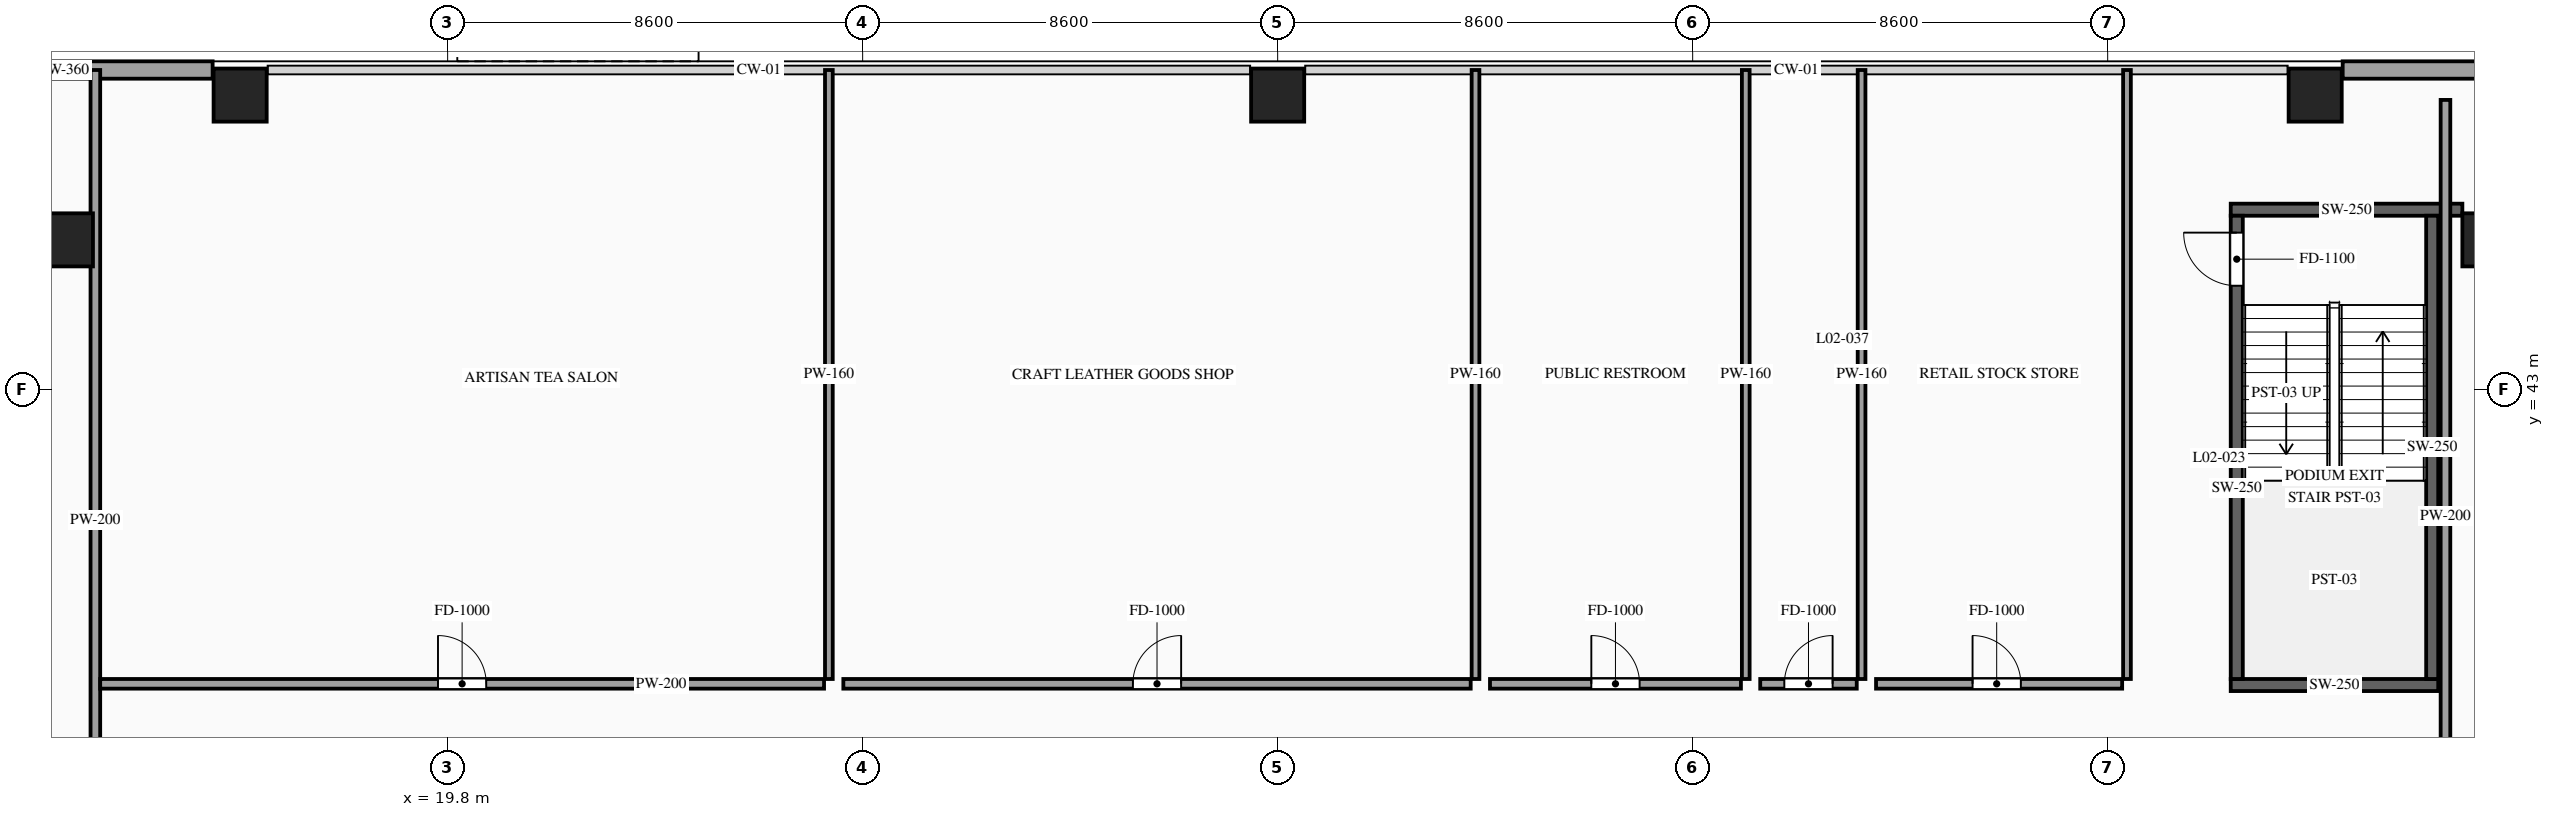
"""IFC4 building model, lengths in metres.
Left out: names, types, materials, properties, quantities, classifications, styles, units other than length and angle.
Written with IfcOpenShell. Run it as: python <this file> out.ifc"""

import sys

from ifc_helpers import new_model, si_unit, direction, frame, frame_2d, origin, origin_2d, place, context, subcontext, project, spatial, rectangle, extrude, source, transform, mapped, element, fill, save


model = new_model("IFC4")
c1 = context("Model", 3, precision=1e-05, world=origin(), true_north=direction((0.0, 1.0)))
c2 = subcontext(c1, "Body", "Model", "MODEL_VIEW")
j1 = project(units=[si_unit("LENGTHUNIT", "METRE"), si_unit("PLANEANGLEUNIT", "RADIAN")], contexts=[c1])
p1 = place(None, origin())
s1 = spatial("IfcSite", under=j1, at=p1, CompositionType="ELEMENT")
p2 = place(p1, origin())
s2 = spatial("IfcBuilding", under=s1, at=p2, CompositionType="ELEMENT")
p3 = place(p2, frame((0.0, 0.0, 5.4)))
s3 = spatial("IfcBuildingStorey", under=s2, at=p3, CompositionType="ELEMENT", Elevation=5.4)
m1 = source(origin(), c2, "Body", "SweptSolid", [
    extrude(rectangle(XDim=1.1, YDim=1.1, at=origin_2d()), origin(), (0.0, 0.0, 1.0), 4.8),
])
for number, where, z_axis, x_axis in (
    (1, (11.9, 46.1, 0.0), (0.0, 0.0, 1.0), (1.0, 0.0, 0.0)),
    (2, (62.1, 46.1, 0.0), (0.0, 0.0, 1.0), (1.0, 0.0, 0.0)),
    (3, (15.5, 49.1, 0.0), (0.0, 0.0, 1.0), (1.0, 0.0, 0.0)),
    (4, (37.0, 49.1, 0.0), (0.0, 0.0, 1.0), (1.0, 0.0, 0.0)),
    (5, (58.5, 49.1, 0.0), (0.0, 0.0, 1.0), (1.0, 0.0, 0.0)),
):
    element("IfcColumn", number, at=place(p3, frame(where, z_axis=z_axis, x_axis=x_axis)), inside=s3, PredefinedType="COLUMN", context=c2, shape_type="MappedRepresentation", body=[
        mapped(m1, transform((0.0, 0.0, 0.0), scale=1.0)),
    ])
p4 = place(p3, frame((2.0, 49.62, 0.0), z_axis=(0.0, 0.0, 1.0), x_axis=(1.0, 0.0, 0.0)))
e6 = element("IfcWall", 6, at=p4, inside=s3, PredefinedType="SOLIDWALL", context=c2, shape_type="SweptSolid", body=[
    extrude(rectangle(XDim=12.93, YDim=0.36, at=frame_2d((6.465, 0.0))), origin(), (0.0, 0.0, 1.0), 4.52),
])
p5 = place(p4, frame((4.7, 0.0, 0.9)))
e7 = element("IfcOpeningElement", 7, at=p5, cuts=e6, PredefinedType="OPENING", context=c2, shape_type="SweptSolid", body=[
    extrude(rectangle(XDim=1.8, YDim=2.2, at=frame_2d((0.9, 1.1))), frame((0.0, 0.195, 0.0), z_axis=(0.0, -1.0, 0.0), x_axis=(1.0, 0.0, 0.0)), (0.0, 0.0, 1.0), 0.39),
])
p6 = place(p3, frame((59.07, 49.62, 0.0), z_axis=(0.0, 0.0, 1.0), x_axis=(1.0, 0.0, 0.0)))
e8 = element("IfcWall", 8, at=p6, inside=s3, PredefinedType="SOLIDWALL", context=c2, shape_type="SweptSolid", body=[
    extrude(rectangle(XDim=12.93, YDim=0.36, at=frame_2d((6.465, 0.0))), origin(), (0.0, 0.0, 1.0), 4.52),
])
p7 = place(p6, frame((6.03, 0.0, 0.9)))
e9 = element("IfcOpeningElement", 9, at=p7, cuts=e8, PredefinedType="OPENING", context=c2, shape_type="SweptSolid", body=[
    extrude(rectangle(XDim=1.8, YDim=2.2, at=frame_2d((0.9, 1.1))), frame((0.0, 0.195, 0.0), z_axis=(0.0, -1.0, 0.0), x_axis=(1.0, 0.0, 0.0)), (0.0, 0.0, 1.0), 0.39),
])
m2 = source(origin(), c2, "Body", "SweptSolid", [
    extrude(rectangle(XDim=4.3, YDim=0.25, at=frame_2d((2.15, 0.0))), origin(), (0.0, 0.0, 1.0), 4.52),
])
p8 = place(p3, frame((56.75, 36.875, 0.0), z_axis=(0.0, 0.0, 1.0), x_axis=(1.0, 0.0, 0.0)))
e10 = element("IfcWall", 10, at=p8, inside=s3, PredefinedType="SOLIDWALL", context=c2, shape_type="MappedRepresentation", body=[
    mapped(m2, transform((0.0, 0.0, 0.0), scale=1.0)),
])
m3 = source(origin(), c2, "Body", "SweptSolid", [
    extrude(rectangle(XDim=4.8, YDim=0.25, at=frame_2d((2.4, 0.0))), origin(), (0.0, 0.0, 1.0), 4.52),
])
p9 = place(p3, frame((56.75, 46.725, 0.0), z_axis=(0.0, 0.0, 1.0), x_axis=(1.0, 0.0, 0.0)))
e11 = element("IfcWall", 11, at=p9, inside=s3, PredefinedType="SOLIDWALL", context=c2, shape_type="MappedRepresentation", body=[
    mapped(m3, transform((0.0, 0.0, 0.0), scale=1.0)),
])
p10 = place(p3, frame((56.875, 37.0, 0.0), z_axis=(0.0, 0.0, 1.0), x_axis=(0.0, 1.0, 0.0)))
e12 = element("IfcWall", 12, at=p10, inside=s3, PredefinedType="SOLIDWALL", context=c2, shape_type="SweptSolid", body=[
    extrude(rectangle(XDim=9.6, YDim=0.25, at=frame_2d((4.8, 0.0))), origin(), (0.0, 0.0, 1.0), 4.52),
])
p11 = place(p10, frame((8.15, 0.0, 0.0)))
e13 = element("IfcOpeningElement", 13, at=p11, cuts=e12, PredefinedType="OPENING", context=c2, shape_type="SweptSolid", body=[
    extrude(rectangle(XDim=1.1, YDim=2.2, at=frame_2d((0.55, 1.1))), frame((0.0, 0.14, 0.0), z_axis=(0.0, -1.0, 0.0), x_axis=(1.0, 0.0, 0.0)), (0.0, 0.0, 1.0), 0.28),
])
m4 = source(origin(), c2, "Body", "SweptSolid", [
    extrude(rectangle(XDim=9.6, YDim=0.25, at=frame_2d((4.8, 0.0))), origin(), (0.0, 0.0, 1.0), 4.52),
])
p12 = place(p3, frame((60.925, 37.0, 0.0), z_axis=(0.0, 0.0, 1.0), x_axis=(0.0, 1.0, 0.0)))
e14 = element("IfcWall", 14, at=p12, inside=s3, PredefinedType="SOLIDWALL", context=c2, shape_type="MappedRepresentation", body=[
    mapped(m4, transform((0.0, 0.0, 0.0), scale=1.0)),
])
p13 = place(p3, frame((12.5, 24.8, 0.0), z_axis=(0.0, 0.0, 1.0), x_axis=(0.0, 1.0, 0.0)))
e15 = element("IfcWall", 15, at=p13, inside=s3, PredefinedType="PARTITIONING", context=c2, shape_type="SweptSolid", body=[
    extrude(rectangle(XDim=24.82, YDim=0.2, at=frame_2d((12.41, 0.0))), origin(), (0.0, 0.0, 1.0), 4.52),
])
p14 = place(p13, frame((4.9, 0.0, 0.0)))
e16 = element("IfcOpeningElement", 16, at=p14, cuts=e15, PredefinedType="OPENING", context=c2, shape_type="SweptSolid", body=[
    extrude(rectangle(XDim=1.0, YDim=2.2, at=frame_2d((0.5, 1.1))), frame((0.0, 0.115, 0.0), z_axis=(0.0, -1.0, 0.0), x_axis=(1.0, 0.0, 0.0)), (0.0, 0.0, 1.0), 0.23),
])
p15 = place(p3, frame((61.2, 24.8, 0.0), z_axis=(0.0, 0.0, 1.0), x_axis=(0.0, 1.0, 0.0)))
e17 = element("IfcWall", 17, at=p15, inside=s3, PredefinedType="PARTITIONING", context=c2, shape_type="SweptSolid", body=[
    extrude(rectangle(XDim=24.2, YDim=0.2, at=frame_2d((12.1, 0.0))), origin(), (0.0, 0.0, 1.0), 4.52),
])
p16 = place(p15, frame((5.7, 0.0, 0.0)))
e18 = element("IfcOpeningElement", 18, at=p16, cuts=e17, PredefinedType="OPENING", context=c2, shape_type="SweptSolid", body=[
    extrude(rectangle(XDim=1.0, YDim=2.2, at=frame_2d((0.5, 1.1))), frame((0.0, 0.115, 0.0), z_axis=(0.0, -1.0, 0.0), x_axis=(1.0, 0.0, 0.0)), (0.0, 0.0, 1.0), 0.23),
])
p17 = place(p3, frame((12.6, 36.9, 0.0), z_axis=(0.0, 0.0, 1.0), x_axis=(1.0, 0.0, 0.0)))
e19 = element("IfcWall", 19, at=p17, inside=s3, PredefinedType="PARTITIONING", context=c2, shape_type="SweptSolid", body=[
    extrude(rectangle(XDim=15.0, YDim=0.2, at=frame_2d((7.5, 0.0))), origin(), (0.0, 0.0, 1.0), 4.52),
])
p18 = place(p17, frame((7.0, 0.0, 0.0)))
e20 = element("IfcOpeningElement", 20, at=p18, cuts=e19, PredefinedType="OPENING", context=c2, shape_type="SweptSolid", body=[
    extrude(rectangle(XDim=1.0, YDim=2.2, at=frame_2d((0.5, 1.1))), frame((0.0, 0.115, 0.0), z_axis=(0.0, -1.0, 0.0), x_axis=(1.0, 0.0, 0.0)), (0.0, 0.0, 1.0), 0.23),
])
m5 = source(origin(), c2, "Body", "SweptSolid", [
    extrude(rectangle(XDim=12.62, YDim=0.16, at=frame_2d((6.31, 0.0))), origin(), (0.0, 0.0, 1.0), 4.52),
])
p19 = place(p3, frame((27.7, 37.0, 0.0), z_axis=(0.0, 0.0, 1.0), x_axis=(0.0, 1.0, 0.0)))
e21 = element("IfcWall", 21, at=p19, inside=s3, PredefinedType="PARTITIONING", context=c2, shape_type="MappedRepresentation", body=[
    mapped(m5, transform((0.0, 0.0, 0.0), scale=1.0)),
])
p20 = place(p3, frame((28.0, 36.9, 0.0), z_axis=(0.0, 0.0, 1.0), x_axis=(1.0, 0.0, 0.0)))
e22 = element("IfcWall", 22, at=p20, inside=s3, PredefinedType="PARTITIONING", context=c2, shape_type="SweptSolid", body=[
    extrude(rectangle(XDim=13.0, YDim=0.2, at=frame_2d((6.5, 0.0))), origin(), (0.0, 0.0, 1.0), 4.52),
])
p21 = place(p20, frame((6.0, 0.0, 0.0)))
e23 = element("IfcOpeningElement", 23, at=p21, cuts=e22, PredefinedType="OPENING", context=c2, shape_type="SweptSolid", body=[
    extrude(rectangle(XDim=1.0, YDim=2.2, at=frame_2d((0.5, 1.1))), frame((0.0, 0.115, 0.0), z_axis=(0.0, -1.0, 0.0), x_axis=(1.0, 0.0, 0.0)), (0.0, 0.0, 1.0), 0.23),
])
p22 = place(p3, frame((41.1, 37.0, 0.0), z_axis=(0.0, 0.0, 1.0), x_axis=(0.0, 1.0, 0.0)))
e24 = element("IfcWall", 24, at=p22, inside=s3, PredefinedType="PARTITIONING", context=c2, shape_type="MappedRepresentation", body=[
    mapped(m5, transform((0.0, 0.0, 0.0), scale=1.0)),
])
p23 = place(p3, frame((41.4, 36.9, 0.0), z_axis=(0.0, 0.0, 1.0), x_axis=(1.0, 0.0, 0.0)))
e25 = element("IfcWall", 25, at=p23, inside=s3, PredefinedType="PARTITIONING", context=c2, shape_type="SweptSolid", body=[
    extrude(rectangle(XDim=5.2, YDim=0.2, at=frame_2d((2.6, 0.0))), origin(), (0.0, 0.0, 1.0), 4.52),
])
p24 = place(p23, frame((2.1, 0.0, 0.0)))
e26 = element("IfcOpeningElement", 26, at=p24, cuts=e25, PredefinedType="OPENING", context=c2, shape_type="SweptSolid", body=[
    extrude(rectangle(XDim=1.0, YDim=2.2, at=frame_2d((0.5, 1.1))), frame((0.0, 0.115, 0.0), z_axis=(0.0, -1.0, 0.0), x_axis=(1.0, 0.0, 0.0)), (0.0, 0.0, 1.0), 0.23),
])
p25 = place(p3, frame((46.7, 37.0, 0.0), z_axis=(0.0, 0.0, 1.0), x_axis=(0.0, 1.0, 0.0)))
e27 = element("IfcWall", 27, at=p25, inside=s3, PredefinedType="PARTITIONING", context=c2, shape_type="MappedRepresentation", body=[
    mapped(m5, transform((0.0, 0.0, 0.0), scale=1.0)),
])
p26 = place(p3, frame((47.0, 36.9, 0.0), z_axis=(0.0, 0.0, 1.0), x_axis=(1.0, 0.0, 0.0)))
e28 = element("IfcWall", 28, at=p26, inside=s3, PredefinedType="PARTITIONING", context=c2, shape_type="SweptSolid", body=[
    extrude(rectangle(XDim=2.0, YDim=0.2, at=frame_2d((1.0, 0.0))), origin(), (0.0, 0.0, 1.0), 4.52),
])
p27 = place(p26, frame((0.5, 0.0, 0.0)))
e29 = element("IfcOpeningElement", 29, at=p27, cuts=e28, PredefinedType="OPENING", context=c2, shape_type="SweptSolid", body=[
    extrude(rectangle(XDim=1.0, YDim=2.2, at=frame_2d((0.5, 1.1))), frame((0.0, 0.115, 0.0), z_axis=(0.0, -1.0, 0.0), x_axis=(1.0, 0.0, 0.0)), (0.0, 0.0, 1.0), 0.23),
])
p28 = place(p3, frame((49.1, 37.0, 0.0), z_axis=(0.0, 0.0, 1.0), x_axis=(0.0, 1.0, 0.0)))
e30 = element("IfcWall", 30, at=p28, inside=s3, PredefinedType="PARTITIONING", context=c2, shape_type="MappedRepresentation", body=[
    mapped(m5, transform((0.0, 0.0, 0.0), scale=1.0)),
])
p29 = place(p3, frame((49.4, 36.9, 0.0), z_axis=(0.0, 0.0, 1.0), x_axis=(1.0, 0.0, 0.0)))
e31 = element("IfcWall", 31, at=p29, inside=s3, PredefinedType="PARTITIONING", context=c2, shape_type="SweptSolid", body=[
    extrude(rectangle(XDim=5.1, YDim=0.2, at=frame_2d((2.55, 0.0))), origin(), (0.0, 0.0, 1.0), 4.52),
])
p30 = place(p29, frame((2.0, 0.0, 0.0)))
e32 = element("IfcOpeningElement", 32, at=p30, cuts=e31, PredefinedType="OPENING", context=c2, shape_type="SweptSolid", body=[
    extrude(rectangle(XDim=1.0, YDim=2.2, at=frame_2d((0.5, 1.1))), frame((0.0, 0.115, 0.0), z_axis=(0.0, -1.0, 0.0), x_axis=(1.0, 0.0, 0.0)), (0.0, 0.0, 1.0), 0.23),
])
p31 = place(p3, frame((54.6, 37.0, 0.0), z_axis=(0.0, 0.0, 1.0), x_axis=(0.0, 1.0, 0.0)))
e33 = element("IfcWall", 33, at=p31, inside=s3, PredefinedType="PARTITIONING", context=c2, shape_type="MappedRepresentation", body=[
    mapped(m5, transform((0.0, 0.0, 0.0), scale=1.0)),
])
m6 = source(origin(), c2, "Body", "SweptSolid", [
    extrude(rectangle(XDim=1.1, YDim=2.2, at=frame_2d((0.55, 1.1))), frame((0.0, 0.025, 0.0), z_axis=(0.0, -1.0, 0.0), x_axis=(1.0, 0.0, 0.0)), (0.0, 0.0, 1.0), 0.05),
])
p32 = place(p11, origin())
e34 = element("IfcDoor", 34, at=p32, inside=s3, OperationType="SINGLE_SWING_RIGHT", PredefinedType="DOOR", context=c2, shape_type="MappedRepresentation", body=[
    mapped(m6, transform((0.0, 0.0, 0.0), scale=1.0)),
])
fill(e13, e34)
m7 = source(origin(), c2, "Body", "SweptSolid", [
    extrude(rectangle(XDim=1.0, YDim=2.2, at=frame_2d((0.5, 1.1))), frame((0.0, 0.025, 0.0), z_axis=(0.0, -1.0, 0.0), x_axis=(1.0, 0.0, 0.0)), (0.0, 0.0, 1.0), 0.05),
])
p33 = place(p18, origin())
e35 = element("IfcDoor", 35, at=p33, inside=s3, OperationType="SINGLE_SWING_LEFT", PredefinedType="DOOR", context=c2, shape_type="MappedRepresentation", body=[
    mapped(m7, transform((0.0, 0.0, 0.0), scale=1.0)),
])
fill(e20, e35)
p34 = place(p21, origin())
e36 = element("IfcDoor", 36, at=p34, inside=s3, OperationType="SINGLE_SWING_RIGHT", PredefinedType="DOOR", context=c2, shape_type="MappedRepresentation", body=[
    mapped(m7, transform((0.0, 0.0, 0.0), scale=1.0)),
])
fill(e23, e36)
p35 = place(p24, origin())
e37 = element("IfcDoor", 37, at=p35, inside=s3, OperationType="SINGLE_SWING_LEFT", PredefinedType="DOOR", context=c2, shape_type="MappedRepresentation", body=[
    mapped(m7, transform((0.0, 0.0, 0.0), scale=1.0)),
])
fill(e26, e37)
p36 = place(p27, origin())
e38 = element("IfcDoor", 38, at=p36, inside=s3, OperationType="SINGLE_SWING_RIGHT", PredefinedType="DOOR", context=c2, shape_type="MappedRepresentation", body=[
    mapped(m7, transform((0.0, 0.0, 0.0), scale=1.0)),
])
fill(e29, e38)
p37 = place(p30, origin())
e39 = element("IfcDoor", 39, at=p37, inside=s3, OperationType="SINGLE_SWING_LEFT", PredefinedType="DOOR", context=c2, shape_type="MappedRepresentation", body=[
    mapped(m7, transform((0.0, 0.0, 0.0), scale=1.0)),
])
fill(e32, e39)
save(model, sys.argv[1])
